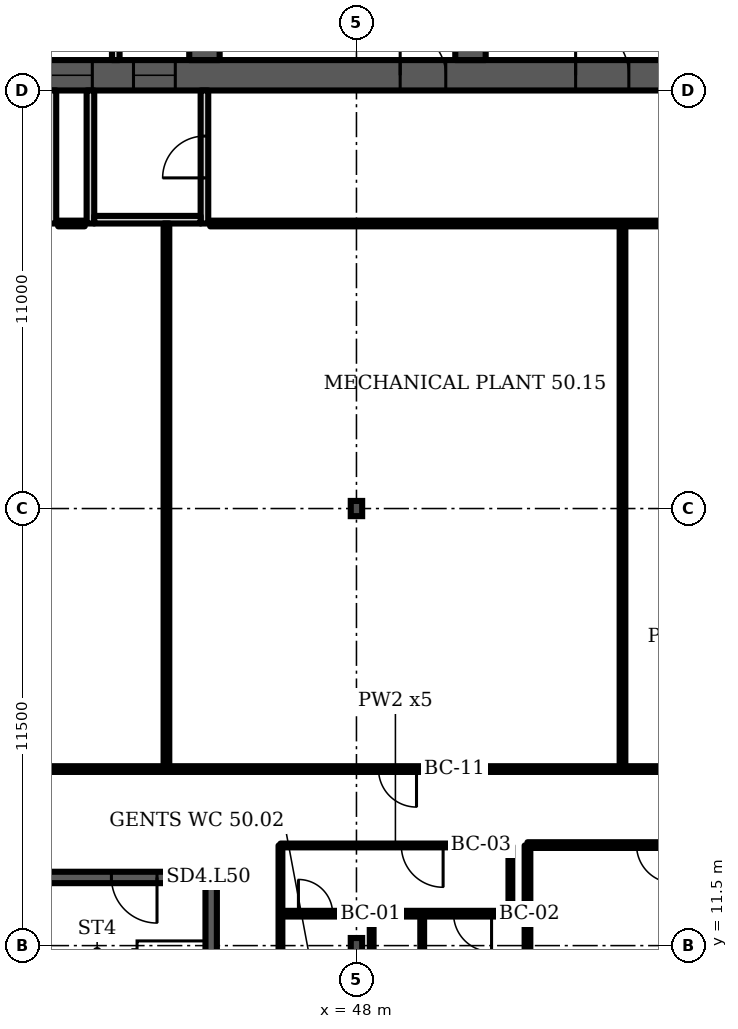
"""IFC4 building model, lengths in metres.
Left out: names, types, materials, properties, quantities, classifications, styles, units other than length and angle.
Written with IfcOpenShell. Run it as: python <this file> out.ifc"""

import sys

from ifc_helpers import new_model, si_unit, direction, frame, frame_2d, origin, origin_2d, place, context, subcontext, project, spatial, polyline, rectangle, i_section, outline, extrude, element, fill, save


model = new_model("IFC4")
c1 = context("Model", 3, precision=1e-05, world=origin(), true_north=direction((0.0, 1.0)))
c2 = subcontext(c1, "Body", "Model", "MODEL_VIEW")
j1 = project(units=[si_unit("LENGTHUNIT", "METRE"), si_unit("PLANEANGLEUNIT", "RADIAN")], contexts=[c1])
p1 = place(None, origin())
s1 = spatial("IfcSite", under=j1, at=p1, CompositionType="ELEMENT")
p2 = place(p1, origin())
s2 = spatial("IfcBuilding", under=s1, at=p2, CompositionType="ELEMENT")
p3 = place(p2, frame((0.0, 0.0, 202.3)))
s3 = spatial("IfcBuildingStorey", under=s2, at=p3, CompositionType="ELEMENT", Elevation=202.3)
p4 = place(p3, frame((16.0, 34.4, 0.0), z_axis=(0.0, 0.0, 1.0), x_axis=(1.0, 0.0, 0.0)))
e1 = element("IfcWall", 1, at=p4, inside=s3, PredefinedType="SHEAR", context=c2, shape_type="SweptSolid", body=[
    extrude(rectangle(XDim=42.0, YDim=0.8, at=frame_2d((21.0, 0.0))), origin(), (0.0, 0.0, 1.0), 4.8),
])
p5 = place(p4, frame((3.2, 0.0, 0.0)))
e2 = element("IfcOpeningElement", 2, at=p5, cuts=e1, PredefinedType="OPENING", context=c2, shape_type="SweptSolid", body=[
    extrude(rectangle(XDim=1.0, YDim=2.1, at=frame_2d((0.5, 1.05))), frame((0.0, 0.41, 0.0), z_axis=(0.0, -1.0, 0.0), x_axis=(1.0, 0.0, 0.0)), (0.0, 0.0, 1.0), 0.82),
])
p6 = place(p4, frame((7.65, 0.0, 0.0)))
e3 = element("IfcOpeningElement", 3, at=p6, cuts=e1, PredefinedType="OPENING", context=c2, shape_type="SweptSolid", body=[
    extrude(rectangle(XDim=1.2, YDim=2.1, at=frame_2d((0.6, 1.05))), frame((0.0, 0.41, 0.0), z_axis=(0.0, -1.0, 0.0), x_axis=(1.0, 0.0, 0.0)), (0.0, 0.0, 1.0), 0.82),
])
p7 = place(p4, frame((14.767, 0.0, 0.0)))
e4 = element("IfcOpeningElement", 4, at=p7, cuts=e1, PredefinedType="OPENING", context=c2, shape_type="SweptSolid", body=[
    extrude(rectangle(XDim=1.1, YDim=2.1, at=frame_2d((0.55, 1.05))), frame((0.0, 0.41, 0.0), z_axis=(0.0, -1.0, 0.0), x_axis=(1.0, 0.0, 0.0)), (0.0, 0.0, 1.0), 0.82),
])
p8 = place(p4, frame((19.133, 0.0, 0.0)))
e5 = element("IfcOpeningElement", 5, at=p8, cuts=e1, PredefinedType="OPENING", context=c2, shape_type="SweptSolid", body=[
    extrude(rectangle(XDim=1.1, YDim=2.1, at=frame_2d((0.55, 1.05))), frame((0.0, 0.41, 0.0), z_axis=(0.0, -1.0, 0.0), x_axis=(1.0, 0.0, 0.0)), (0.0, 0.0, 1.0), 0.82),
])
p9 = place(p4, frame((16.8, 0.0, 0.0)))
e6 = element("IfcOpeningElement", 6, at=p9, cuts=e1, PredefinedType="OPENING", context=c2, shape_type="SweptSolid", body=[
    extrude(rectangle(XDim=1.4, YDim=2.1, at=frame_2d((0.7, 1.05))), frame((0.0, 0.41, 0.0), z_axis=(0.0, -1.0, 0.0), x_axis=(1.0, 0.0, 0.0)), (0.0, 0.0, 1.0), 0.82),
])
p10 = place(p4, frame((21.767, 0.0, 0.0)))
e7 = element("IfcOpeningElement", 7, at=p10, cuts=e1, PredefinedType="OPENING", context=c2, shape_type="SweptSolid", body=[
    extrude(rectangle(XDim=1.1, YDim=2.1, at=frame_2d((0.55, 1.05))), frame((0.0, 0.41, 0.0), z_axis=(0.0, -1.0, 0.0), x_axis=(1.0, 0.0, 0.0)), (0.0, 0.0, 1.0), 0.82),
])
p11 = place(p4, frame((23.95, 0.0, 0.0)))
e8 = element("IfcOpeningElement", 8, at=p11, cuts=e1, PredefinedType="OPENING", context=c2, shape_type="SweptSolid", body=[
    extrude(rectangle(XDim=1.1, YDim=2.1, at=frame_2d((0.55, 1.05))), frame((0.0, 0.41, 0.0), z_axis=(0.0, -1.0, 0.0), x_axis=(1.0, 0.0, 0.0)), (0.0, 0.0, 1.0), 0.82),
])
p12 = place(p4, frame((26.133, 0.0, 0.0)))
e9 = element("IfcOpeningElement", 9, at=p12, cuts=e1, PredefinedType="OPENING", context=c2, shape_type="SweptSolid", body=[
    extrude(rectangle(XDim=1.1, YDim=2.1, at=frame_2d((0.55, 1.05))), frame((0.0, 0.41, 0.0), z_axis=(0.0, -1.0, 0.0), x_axis=(1.0, 0.0, 0.0)), (0.0, 0.0, 1.0), 0.82),
])
p13 = place(p4, frame((33.15, 0.0, 0.0)))
e10 = element("IfcOpeningElement", 10, at=p13, cuts=e1, PredefinedType="OPENING", context=c2, shape_type="SweptSolid", body=[
    extrude(rectangle(XDim=1.2, YDim=2.1, at=frame_2d((0.6, 1.05))), frame((0.0, 0.41, 0.0), z_axis=(0.0, -1.0, 0.0), x_axis=(1.0, 0.0, 0.0)), (0.0, 0.0, 1.0), 0.82),
])
p14 = place(p4, frame((37.767, 0.0, 0.0)))
e11 = element("IfcOpeningElement", 11, at=p14, cuts=e1, PredefinedType="OPENING", context=c2, shape_type="SweptSolid", body=[
    extrude(rectangle(XDim=1.4, YDim=2.1, at=frame_2d((0.7, 1.05))), frame((0.0, 0.41, 0.0), z_axis=(0.0, -1.0, 0.0), x_axis=(1.0, 0.0, 0.0)), (0.0, 0.0, 1.0), 0.82),
])
p15 = place(p3, frame((44.0, 34.8, 0.0), z_axis=(0.0, 0.0, 1.0), x_axis=(0.0, 1.0, 0.0)))
e12 = element("IfcWall", 12, at=p15, inside=s3, PredefinedType="SHEAR", context=c2, shape_type="SweptSolid", body=[
    extrude(rectangle(XDim=14.374, YDim=0.8, at=frame_2d((7.187, 0.0))), origin(), (0.0, 0.0, 1.0), 4.8),
])
p16 = place(p15, frame((11.312, 0.0, 0.0)))
e13 = element("IfcOpeningElement", 13, at=p16, cuts=e12, PredefinedType="OPENING", context=c2, shape_type="SweptSolid", body=[
    extrude(rectangle(XDim=1.0, YDim=2.1, at=frame_2d((0.5, 1.05))), frame((0.0, 0.41, 0.0), z_axis=(0.0, -1.0, 0.0), x_axis=(1.0, 0.0, 0.0)), (0.0, 0.0, 1.0), 0.82),
])
p17 = place(p15, frame((3.6, 0.0, 0.0)))
e14 = element("IfcOpeningElement", 14, at=p17, cuts=e12, PredefinedType="OPENING", context=c2, shape_type="SweptSolid", body=[
    extrude(rectangle(XDim=1.1, YDim=2.1, at=frame_2d((0.55, 1.05))), frame((0.0, 0.41, 0.0), z_axis=(0.0, -1.0, 0.0), x_axis=(1.0, 0.0, 0.0)), (0.0, 0.0, 1.0), 0.82),
])
p18 = place(p3, frame((51.0, 34.8, 0.0), z_axis=(0.0, 0.0, 1.0), x_axis=(0.0, 1.0, 0.0)))
e15 = element("IfcWall", 15, at=p18, inside=s3, PredefinedType="SHEAR", context=c2, shape_type="SweptSolid", body=[
    extrude(rectangle(XDim=13.762, YDim=0.8, at=frame_2d((6.881, 0.0))), origin(), (0.0, 0.0, 1.0), 4.8),
])
p19 = place(p18, frame((3.6, 0.0, 0.0)))
e16 = element("IfcOpeningElement", 16, at=p19, cuts=e15, PredefinedType="OPENING", context=c2, shape_type="SweptSolid", body=[
    extrude(rectangle(XDim=1.1, YDim=2.1, at=frame_2d((0.55, 1.05))), frame((0.0, 0.41, 0.0), z_axis=(0.0, -1.0, 0.0), x_axis=(1.0, 0.0, 0.0)), (0.0, 0.0, 1.0), 0.82),
])
for number, where, z_axis, x_axis in (
    (17, (48.0, 11.5, 0.0), (0.0, 0.0, 1.0), (1.0, 0.0, 0.0)),
    (18, (48.0, 23.0, 0.0), (0.0, 0.0, 1.0), (1.0, 0.0, 0.0)),
):
    element("IfcColumn", number, at=place(p3, frame(where, z_axis=z_axis, x_axis=x_axis)), inside=s3, PredefinedType="COLUMN", context=c2, shape_type="SweptSolid", body=[
        extrude(i_section(OverallWidth=0.3, OverallDepth=0.4, WebThickness=0.013, FlangeThickness=0.024, FilletRadius=0.027, at=origin_2d()), origin(), (0.0, 0.0, 1.0), 4.8),
    ])
p20 = place(p3, frame((0.0, 0.0, -0.0)))
e19 = element("IfcWall", 19, at=p20, inside=s3, PredefinedType="PARTITIONING", context=c2, shape_type="SweptSolid", body=[
    extrude(outline(polyline([(41.567, 37.1), (39.433, 37.1), (39.433, 34.8), (39.233, 34.8), (39.233, 37.65), (37.4, 37.65), (37.4, 37.85), (39.233, 37.85), (39.433, 37.85), (39.433, 37.3), (41.567, 37.3), (41.567, 37.55), (41.767, 37.55), (43.6, 37.55), (43.6, 37.35), (41.767, 37.35), (41.767, 34.8), (41.567, 34.8), (41.567, 37.1)])), origin(), (0.0, 0.0, 1.0), 4.4),
])
for number, where, z_axis, x_axis in (
    (20, (40.0, 30.5, 0.0), (0.0, 0.0, 1.0), (0.0, 1.0, 0.0)),
    (21, (41.0, 30.5, 0.0), (0.0, 0.0, 1.0), (0.0, 1.0, 0.0)),
):
    element("IfcWall", number, at=place(p3, frame(where, z_axis=z_axis, x_axis=x_axis)), inside=s3, PredefinedType="PARTITIONING", context=c2, shape_type="SweptSolid", body=[
        extrude(rectangle(XDim=3.5, YDim=0.2, at=frame_2d((1.75, 0.0))), origin(), (0.0, 0.0, 1.0), 4.4),
    ])
p21 = place(p3, frame((44.0, 30.5, 0.0), z_axis=(0.0, 0.0, 1.0), x_axis=(0.0, 1.0, 0.0)))
e22 = element("IfcWall", 22, at=p21, inside=s3, PredefinedType="PARTITIONING", context=c2, shape_type="SweptSolid", body=[
    extrude(rectangle(XDim=3.5, YDim=0.2, at=frame_2d((1.75, 0.0))), origin(), (0.0, 0.0, 1.0), 4.4),
])
p22 = place(p21, frame((1.2, 0.0, 0.0)))
e23 = element("IfcOpeningElement", 23, at=p22, cuts=e22, PredefinedType="OPENING", context=c2, shape_type="SweptSolid", body=[
    extrude(rectangle(XDim=1.1, YDim=2.1, at=frame_2d((0.55, 1.05))), frame((0.0, 0.11, 0.0), z_axis=(0.0, -1.0, 0.0), x_axis=(1.0, 0.0, 0.0)), (0.0, 0.0, 1.0), 0.22),
])
p23 = place(p3, frame((41.1, 30.6, 0.0), z_axis=(0.0, 0.0, 1.0), x_axis=(1.0, 0.0, 0.0)))
e24 = element("IfcWall", 24, at=p23, inside=s3, PredefinedType="PARTITIONING", context=c2, shape_type="SweptSolid", body=[
    extrude(rectangle(XDim=2.8, YDim=0.2, at=frame_2d((1.4, 0.0))), origin(), (0.0, 0.0, 1.0), 4.4),
])
p24 = place(p3, frame((27.364, 13.293, 0.0), z_axis=(0.0, 0.0, 1.0), x_axis=(1.0, 0.0, 0.0)))
e25 = element("IfcWall", 25, at=p24, inside=s3, PredefinedType="SHEAR", context=c2, shape_type="SweptSolid", body=[
    extrude(rectangle(XDim=16.963, YDim=0.3, at=frame_2d((8.481, 0.0))), origin(), (0.0, 0.0, 1.0), 4.4),
])
p25 = place(p24, frame((14.188, 0.0, 0.0)))
e26 = element("IfcOpeningElement", 26, at=p25, cuts=e25, PredefinedType="OPENING", context=c2, shape_type="SweptSolid", body=[
    extrude(rectangle(XDim=1.2, YDim=2.1, at=frame_2d((0.6, 1.05))), frame((0.0, 0.16, 0.0), z_axis=(0.0, -1.0, 0.0), x_axis=(1.0, 0.0, 0.0)), (0.0, 0.0, 1.0), 0.32),
])
p26 = place(p3, frame((24.8, 16.145, 0.0), z_axis=(0.0, 0.0, 1.0), x_axis=(1.0, 0.0, 0.0)))
e27 = element("IfcWall", 27, at=p26, inside=s3, PredefinedType="PARTITIONING", context=c2, shape_type="SweptSolid", body=[
    extrude(rectangle(XDim=37.305, YDim=0.15, at=frame_2d((18.652, 0.0))), origin(), (0.0, 0.0, 1.0), 4.4),
])
p27 = place(p26, frame((23.78, 0.0, 0.0)))
e28 = element("IfcOpeningElement", 28, at=p27, cuts=e27, PredefinedType="OPENING", context=c2, shape_type="SweptSolid", body=[
    extrude(rectangle(XDim=1.0, YDim=2.1, at=frame_2d((0.5, 1.05))), frame((0.0, 0.085, 0.0), z_axis=(0.0, -1.0, 0.0), x_axis=(1.0, 0.0, 0.0)), (0.0, 0.0, 1.0), 0.17),
])
p28 = place(p26, frame((33.705, 0.0, 0.0)))
e29 = element("IfcOpeningElement", 29, at=p28, cuts=e27, PredefinedType="OPENING", context=c2, shape_type="SweptSolid", body=[
    extrude(rectangle(XDim=1.0, YDim=2.1, at=frame_2d((0.5, 1.05))), frame((0.0, 0.085, 0.0), z_axis=(0.0, -1.0, 0.0), x_axis=(1.0, 0.0, 0.0)), (0.0, 0.0, 1.0), 0.17),
])
p29 = place(p3, frame((43.0, 16.145, 0.0), z_axis=(0.0, 0.0, 1.0), x_axis=(0.0, 1.0, 0.0)))
e30 = element("IfcWall", 30, at=p29, inside=s3, PredefinedType="PARTITIONING", context=c2, shape_type="SweptSolid", body=[
    extrude(rectangle(XDim=14.355, YDim=0.15, at=frame_2d((7.177, 0.0))), origin(), (0.0, 0.0, 1.0), 4.4),
])
p30 = place(p3, frame((46.0, 4.9, 0.0), z_axis=(0.0, 0.0, 1.0), x_axis=(0.0, 1.0, 0.0)))
e31 = element("IfcWall", 31, at=p30, inside=s3, PredefinedType="PARTITIONING", context=c2, shape_type="SweptSolid", body=[
    extrude(rectangle(XDim=9.235, YDim=0.1, at=frame_2d((4.618, 0.0))), origin(), (0.0, 0.0, 1.0), 4.4),
])
p31 = place(p3, frame((46.0, 12.34, 0.0), z_axis=(0.0, 0.0, 1.0), x_axis=(1.0, 0.0, 0.0)))
e32 = element("IfcWall", 32, at=p31, inside=s3, PredefinedType="PARTITIONING", context=c2, shape_type="SweptSolid", body=[
    extrude(rectangle(XDim=6.5, YDim=0.15, at=frame_2d((3.25, 0.0))), origin(), (0.0, 0.0, 1.0), 4.4),
])
p32 = place(p31, frame((0.473, 0.0, 0.0)))
e33 = element("IfcOpeningElement", 33, at=p32, cuts=e32, PredefinedType="OPENING", context=c2, shape_type="SweptSolid", body=[
    extrude(rectangle(XDim=0.9, YDim=2.1, at=frame_2d((0.45, 1.05))), frame((0.0, 0.085, 0.0), z_axis=(0.0, -1.0, 0.0), x_axis=(1.0, 0.0, 0.0)), (0.0, 0.0, 1.0), 0.17),
])
p33 = place(p31, frame((4.555, 0.0, 0.0)))
e34 = element("IfcOpeningElement", 34, at=p33, cuts=e32, PredefinedType="OPENING", context=c2, shape_type="SweptSolid", body=[
    extrude(rectangle(XDim=1.0, YDim=2.1, at=frame_2d((0.5, 1.05))), frame((0.0, 0.085, 0.0), z_axis=(0.0, -1.0, 0.0), x_axis=(1.0, 0.0, 0.0)), (0.0, 0.0, 1.0), 0.17),
])
p34 = place(p3, frame((46.0, 14.135, 0.0), z_axis=(0.0, 0.0, 1.0), x_axis=(1.0, 0.0, 0.0)))
e35 = element("IfcWall", 35, at=p34, inside=s3, PredefinedType="PARTITIONING", context=c2, shape_type="SweptSolid", body=[
    extrude(rectangle(XDim=6.05, YDim=0.1, at=frame_2d((3.025, 0.0))), origin(), (0.0, 0.0, 1.0), 4.4),
])
p35 = place(p34, frame((3.18, 0.0, 0.0)))
e36 = element("IfcOpeningElement", 36, at=p35, cuts=e35, PredefinedType="OPENING", context=c2, shape_type="SweptSolid", body=[
    extrude(rectangle(XDim=1.1, YDim=2.1, at=frame_2d((0.55, 1.05))), frame((0.0, 0.06, 0.0), z_axis=(0.0, -1.0, 0.0), x_axis=(1.0, 0.0, 0.0)), (0.0, 0.0, 1.0), 0.12),
])
p36 = place(p3, frame((48.4, 4.7, 0.0), z_axis=(0.0, 0.0, 1.0), x_axis=(0.0, 1.0, 0.0)))
e37 = element("IfcWall", 37, at=p36, inside=s3, PredefinedType="PARTITIONING", context=c2, shape_type="SweptSolid", body=[
    extrude(rectangle(XDim=7.64, YDim=0.1, at=frame_2d((3.82, 0.0))), origin(), (0.0, 0.0, 1.0), 4.4),
])
p37 = place(p3, frame((49.73, 4.62, 0.0), z_axis=(0.0, 0.0, 1.0), x_axis=(0.0, 1.0, 0.0)))
e38 = element("IfcWall", 38, at=p37, inside=s3, PredefinedType="PARTITIONING", context=c2, shape_type="SweptSolid", body=[
    extrude(rectangle(XDim=7.72, YDim=0.1, at=frame_2d((3.86, 0.0))), origin(), (0.0, 0.0, 1.0), 4.4),
])
p38 = place(p3, frame((52.05, 12.345, 0.0), z_axis=(0.0, 0.0, 1.0), x_axis=(0.0, 1.0, 0.0)))
e39 = element("IfcWall", 39, at=p38, inside=s3, PredefinedType="PARTITIONING", context=c2, shape_type="SweptSolid", body=[
    extrude(rectangle(XDim=1.79, YDim=0.1, at=frame_2d((0.895, 0.0))), origin(), (0.0, 0.0, 1.0), 4.4),
])
p39 = place(p3, frame((52.5, 4.855, 0.0), z_axis=(0.0, 0.0, 1.0), x_axis=(0.0, 1.0, 0.0)))
e40 = element("IfcWall", 40, at=p39, inside=s3, PredefinedType="PARTITIONING", context=c2, shape_type="SweptSolid", body=[
    extrude(rectangle(XDim=9.28, YDim=0.15, at=frame_2d((4.64, 0.0))), origin(), (0.0, 0.0, 1.0), 4.4),
])
p40 = place(p3, frame((52.5, 14.145, 0.0), z_axis=(0.0, 0.0, 1.0), x_axis=(1.0, 0.0, 0.0)))
e41 = element("IfcWall", 41, at=p40, inside=s3, PredefinedType="PARTITIONING", context=c2, shape_type="SweptSolid", body=[
    extrude(rectangle(XDim=6.05, YDim=0.15, at=frame_2d((3.025, 0.0))), origin(), (0.0, 0.0, 1.0), 4.4),
])
p41 = place(p40, frame((2.87, 0.0, 0.0)))
e42 = element("IfcOpeningElement", 42, at=p41, cuts=e41, PredefinedType="OPENING", context=c2, shape_type="SweptSolid", body=[
    extrude(rectangle(XDim=1.0, YDim=2.1, at=frame_2d((0.5, 1.05))), frame((0.0, 0.085, 0.0), z_axis=(0.0, -1.0, 0.0), x_axis=(1.0, 0.0, 0.0)), (0.0, 0.0, 1.0), 0.17),
])
p42 = place(p3, frame((55.0, 16.145, 0.0), z_axis=(0.0, 0.0, 1.0), x_axis=(0.0, 1.0, 0.0)))
e43 = element("IfcWall", 43, at=p42, inside=s3, PredefinedType="PARTITIONING", context=c2, shape_type="SweptSolid", body=[
    extrude(rectangle(XDim=14.355, YDim=0.15, at=frame_2d((7.177, 0.0))), origin(), (0.0, 0.0, 1.0), 4.4),
])
p43 = place(p3, frame((40.15, 30.5, 0.0), z_axis=(0.0, 0.0, 1.0), x_axis=(1.0, 0.0, 0.0)))
e44 = element("IfcWall", 44, at=p43, inside=s3, PredefinedType="PARTITIONING", context=c2, shape_type="SweptSolid", body=[
    extrude(rectangle(XDim=0.7, YDim=0.15, at=frame_2d((0.35, 0.0))), origin(), (0.0, 0.0, 1.0), 4.4),
])
p44 = place(p3, frame((44.15, 30.5, 0.0), z_axis=(0.0, 0.0, 1.0), x_axis=(1.0, 0.0, 0.0)))
e45 = element("IfcWall", 45, at=p44, inside=s3, PredefinedType="PARTITIONING", context=c2, shape_type="SweptSolid", body=[
    extrude(rectangle(XDim=12.95, YDim=0.15, at=frame_2d((6.475, 0.0))), origin(), (0.0, 0.0, 1.0), 4.4),
])
p45 = place(p3, frame((44.177, 4.234, 0.0), z_axis=(0.0, 0.0, 1.0), x_axis=(0.0, 1.0, 0.0)))
e46 = element("IfcWall", 46, at=p45, inside=s3, PredefinedType="SHEAR", context=c2, shape_type="SweptSolid", body=[
    extrude(rectangle(XDim=8.909, YDim=0.3, at=frame_2d((4.455, 0.0))), origin(), (0.0, 0.0, 1.0), 4.4),
])
p46 = place(p11, origin())
e47 = element("IfcDoor", 47, at=p46, inside=s3, OperationType="DOUBLE_DOOR_SLIDING", PredefinedType="DOOR", context=c2, shape_type="SweptSolid", body=[
    extrude(rectangle(XDim=1.1, YDim=2.1, at=frame_2d((0.55, 1.05))), frame((0.0, 0.025, 0.0), z_axis=(0.0, -1.0, 0.0), x_axis=(1.0, 0.0, 0.0)), (0.0, 0.0, 1.0), 0.05),
])
fill(e8, e47)
p47 = place(p12, origin())
e48 = element("IfcDoor", 48, at=p47, inside=s3, OperationType="DOUBLE_DOOR_SLIDING", PredefinedType="DOOR", context=c2, shape_type="SweptSolid", body=[
    extrude(rectangle(XDim=1.1, YDim=2.1, at=frame_2d((0.55, 1.05))), frame((0.0, 0.025, 0.0), z_axis=(0.0, -1.0, 0.0), x_axis=(1.0, 0.0, 0.0)), (0.0, 0.0, 1.0), 0.05),
])
fill(e9, e48)
p48 = place(p13, origin())
e49 = element("IfcDoor", 49, at=p48, inside=s3, OperationType="SINGLE_SWING_LEFT", PredefinedType="DOOR", context=c2, shape_type="SweptSolid", body=[
    extrude(rectangle(XDim=1.2, YDim=2.1, at=frame_2d((0.6, 1.05))), frame((0.0, 0.025, 0.0), z_axis=(0.0, -1.0, 0.0), x_axis=(1.0, 0.0, 0.0)), (0.0, 0.0, 1.0), 0.05),
])
fill(e10, e49)
p49 = place(p14, origin())
e50 = element("IfcDoor", 50, at=p49, inside=s3, OperationType="DOUBLE_DOOR_SINGLE_SWING", PredefinedType="DOOR", context=c2, shape_type="SweptSolid", body=[
    extrude(rectangle(XDim=1.4, YDim=2.1, at=frame_2d((0.7, 1.05))), frame((0.0, 0.025, 0.0), z_axis=(0.0, -1.0, 0.0), x_axis=(1.0, 0.0, 0.0)), (0.0, 0.0, 1.0), 0.05),
])
fill(e11, e50)
p50 = place(p22, origin())
e51 = element("IfcDoor", 51, at=p50, inside=s3, OperationType="SINGLE_SWING_LEFT", PredefinedType="DOOR", context=c2, shape_type="SweptSolid", body=[
    extrude(rectangle(XDim=1.1, YDim=2.1, at=frame_2d((0.55, 1.05))), frame((0.0, 0.025, 0.0), z_axis=(0.0, -1.0, 0.0), x_axis=(1.0, 0.0, 0.0)), (0.0, 0.0, 1.0), 0.05),
])
fill(e23, e51)
p51 = place(p25, origin())
e52 = element("IfcDoor", 52, at=p51, inside=s3, OperationType="SINGLE_SWING_RIGHT", PredefinedType="DOOR", context=c2, shape_type="SweptSolid", body=[
    extrude(rectangle(XDim=1.2, YDim=2.1, at=frame_2d((0.6, 1.05))), frame((0.0, 0.025, 0.0), z_axis=(0.0, -1.0, 0.0), x_axis=(1.0, 0.0, 0.0)), (0.0, 0.0, 1.0), 0.05),
])
fill(e26, e52)
p52 = place(p32, origin())
e53 = element("IfcDoor", 53, at=p52, inside=s3, OperationType="SINGLE_SWING_LEFT", PredefinedType="DOOR", context=c2, shape_type="SweptSolid", body=[
    extrude(rectangle(XDim=0.9, YDim=2.1, at=frame_2d((0.45, 1.05))), frame((0.0, 0.025, 0.0), z_axis=(0.0, -1.0, 0.0), x_axis=(1.0, 0.0, 0.0)), (0.0, 0.0, 1.0), 0.05),
])
fill(e33, e53)
p53 = place(p33, origin())
e54 = element("IfcDoor", 54, at=p53, inside=s3, OperationType="SINGLE_SWING_RIGHT", PredefinedType="DOOR", context=c2, shape_type="SweptSolid", body=[
    extrude(rectangle(XDim=1.0, YDim=2.1, at=frame_2d((0.5, 1.05))), frame((0.0, 0.025, 0.0), z_axis=(0.0, -1.0, 0.0), x_axis=(1.0, 0.0, 0.0)), (0.0, 0.0, 1.0), 0.05),
])
fill(e34, e54)
p54 = place(p35, origin())
e55 = element("IfcDoor", 55, at=p54, inside=s3, OperationType="SINGLE_SWING_RIGHT", PredefinedType="DOOR", context=c2, shape_type="SweptSolid", body=[
    extrude(rectangle(XDim=1.1, YDim=2.1, at=frame_2d((0.55, 1.05))), frame((0.0, 0.025, 0.0), z_axis=(0.0, -1.0, 0.0), x_axis=(1.0, 0.0, 0.0)), (0.0, 0.0, 1.0), 0.05),
])
fill(e36, e55)
p55 = place(p41, origin())
e56 = element("IfcDoor", 56, at=p55, inside=s3, OperationType="SINGLE_SWING_RIGHT", PredefinedType="DOOR", context=c2, shape_type="SweptSolid", body=[
    extrude(rectangle(XDim=1.0, YDim=2.1, at=frame_2d((0.5, 1.05))), frame((0.0, 0.025, 0.0), z_axis=(0.0, -1.0, 0.0), x_axis=(1.0, 0.0, 0.0)), (0.0, 0.0, 1.0), 0.05),
])
fill(e42, e56)
p56 = place(p27, origin())
e57 = element("IfcDoor", 57, at=p56, inside=s3, OperationType="SINGLE_SWING_RIGHT", PredefinedType="DOOR", context=c2, shape_type="SweptSolid", body=[
    extrude(rectangle(XDim=1.0, YDim=2.1, at=frame_2d((0.5, 1.05))), frame((0.0, 0.025, 0.0), z_axis=(0.0, -1.0, 0.0), x_axis=(1.0, 0.0, 0.0)), (0.0, 0.0, 1.0), 0.05),
])
fill(e28, e57)
save(model, sys.argv[1])
